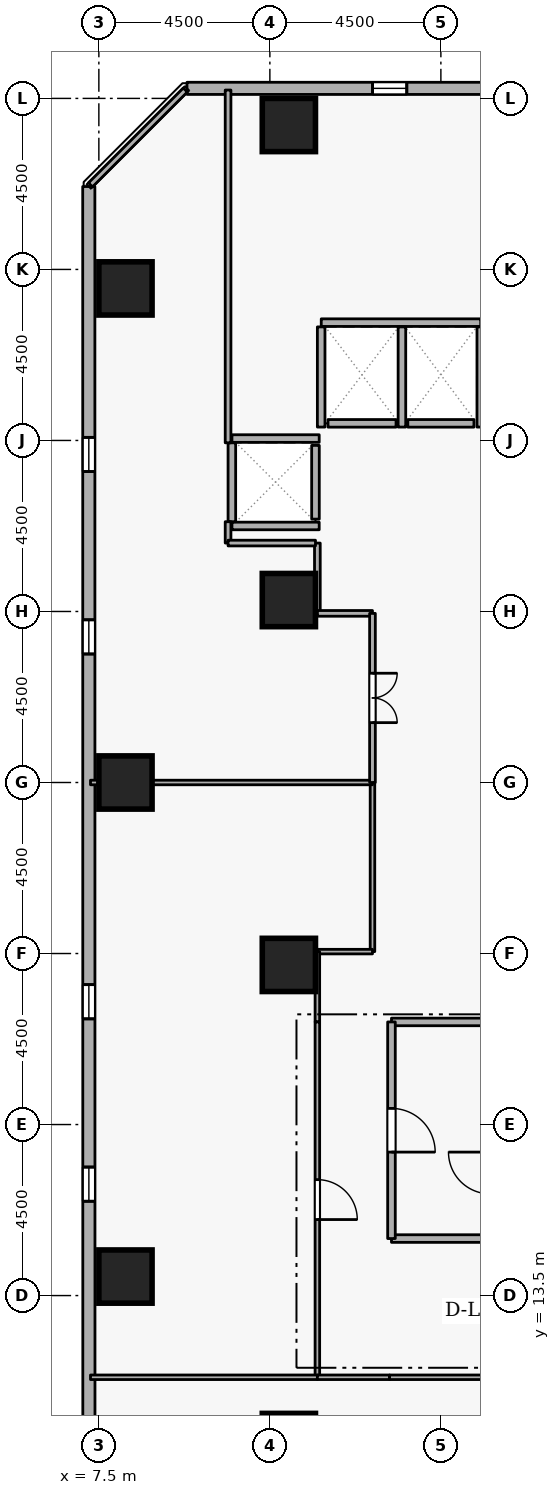
"""IFC4 building model, lengths in metres.
Left out: names, types, materials, properties, quantities, classifications, styles, units other than length and angle.
Written with IfcOpenShell. Run it as: python <this file> out.ifc"""

import sys

from ifc_helpers import new_model, si_unit, direction, frame, frame_2d, origin, origin_2d, place, context, subcontext, project, spatial, rectangle, extrude, element, fill, save


model = new_model("IFC4")
c1 = context("Model", 3, precision=1e-05, world=origin(), true_north=direction((0.0, 1.0)))
c2 = subcontext(c1, "Body", "Model", "MODEL_VIEW")
j1 = project(units=[si_unit("LENGTHUNIT", "METRE"), si_unit("PLANEANGLEUNIT", "RADIAN")], contexts=[c1])
p1 = place(None, origin())
s1 = spatial("IfcSite", under=j1, at=p1, CompositionType="ELEMENT")
p2 = place(p1, origin())
s2 = spatial("IfcBuilding", under=s1, at=p2, CompositionType="ELEMENT")
p3 = place(p2, frame((0.0, 0.0, 57.3)))
s3 = spatial("IfcBuildingStorey", under=s2, at=p3, CompositionType="ELEMENT", Elevation=57.3)
for number, where, z_axis, x_axis in (
    (1, (12.5, 9.7, 0.0), (0.0, 0.0, 1.0), (1.0, 0.0, 0.0)),
    (2, (12.5, 44.3, 0.0), (0.0, 0.0, 1.0), (1.0, 0.0, 0.0)),
    (3, (8.2, 14.0, 0.0), (0.0, 0.0, 1.0), (1.0, 0.0, 0.0)),
    (4, (8.2, 27.0, 0.0), (0.0, 0.0, 1.0), (1.0, 0.0, 0.0)),
    (5, (8.2, 40.0, 0.0), (0.0, 0.0, 1.0), (1.0, 0.0, 0.0)),
    (6, (12.5, 22.2, 0.0), (0.0, 0.0, 1.0), (1.0, 0.0, 0.0)),
    (7, (12.5, 31.8, 0.0), (0.0, 0.0, 1.0), (1.0, 0.0, 0.0)),
):
    element("IfcColumn", number, at=place(p3, frame(where, z_axis=z_axis, x_axis=x_axis)), inside=s3, PredefinedType="COLUMN", context=c2, shape_type="SweptSolid", body=[
        extrude(rectangle(XDim=1.4, YDim=1.4, at=origin_2d()), origin(), (0.0, 0.0, 1.0), 3.6),
    ])
p4 = place(p3, frame((46.203, 45.262, 0.0), z_axis=(0.0, 0.0, 1.0), x_axis=(-0.999999996195, 8.7231344e-05, 0.0)))
e8 = element("IfcWall", 8, at=p4, inside=s3, PredefinedType="STANDARD", context=c2, shape_type="SweptSolid", body=[
    extrude(rectangle(XDim=36.384, YDim=0.32, at=frame_2d((18.192, 0.0))), origin(), (0.0, 0.0, 1.0), 2.7),
])
p5 = place(p4, frame((1.8, 0.0, 0.72)))
e9 = element("IfcOpeningElement", 9, at=p5, cuts=e8, PredefinedType="OPENING", context=c2, shape_type="SweptSolid", body=[
    extrude(rectangle(XDim=0.9, YDim=1.75, at=frame_2d((0.45, 0.875))), frame((0.0, 0.17, 0.0), z_axis=(0.0, -1.0, 0.0), x_axis=(1.0, 0.0, 0.0)), (0.0, 0.0, 1.0), 0.34),
])
p6 = place(p4, frame((11.4, 0.0, 0.72)))
e10 = element("IfcOpeningElement", 10, at=p6, cuts=e8, PredefinedType="OPENING", context=c2, shape_type="SweptSolid", body=[
    extrude(rectangle(XDim=0.9, YDim=1.75, at=frame_2d((0.45, 0.875))), frame((0.0, 0.17, 0.0), z_axis=(0.0, -1.0, 0.0), x_axis=(1.0, 0.0, 0.0)), (0.0, 0.0, 1.0), 0.34),
])
p7 = place(p4, frame((16.2, 0.0, 0.72)))
e11 = element("IfcOpeningElement", 11, at=p7, cuts=e8, PredefinedType="OPENING", context=c2, shape_type="SweptSolid", body=[
    extrude(rectangle(XDim=0.9, YDim=1.75, at=frame_2d((0.45, 0.875))), frame((0.0, 0.17, 0.0), z_axis=(0.0, -1.0, 0.0), x_axis=(1.0, 0.0, 0.0)), (0.0, 0.0, 1.0), 0.34),
])
p8 = place(p4, frame((25.8, 0.0, 0.72)))
e12 = element("IfcOpeningElement", 12, at=p8, cuts=e8, PredefinedType="OPENING", context=c2, shape_type="SweptSolid", body=[
    extrude(rectangle(XDim=0.9, YDim=1.75, at=frame_2d((0.45, 0.875))), frame((0.0, 0.17, 0.0), z_axis=(0.0, -1.0, 0.0), x_axis=(1.0, 0.0, 0.0)), (0.0, 0.0, 1.0), 0.34),
])
p9 = place(p4, frame((30.6, 0.0, 0.72)))
e13 = element("IfcOpeningElement", 13, at=p9, cuts=e8, PredefinedType="OPENING", context=c2, shape_type="SweptSolid", body=[
    extrude(rectangle(XDim=0.9, YDim=1.75, at=frame_2d((0.45, 0.875))), frame((0.0, 0.17, 0.0), z_axis=(0.0, -1.0, 0.0), x_axis=(1.0, 0.0, 0.0)), (0.0, 0.0, 1.0), 0.34),
])
p10 = place(p3, frame((7.235, 42.681, 0.0), z_axis=(0.0, 0.0, 1.0), x_axis=(8.7231344e-05, -0.999999996195, 0.0)))
e14 = element("IfcWall", 14, at=p10, inside=s3, PredefinedType="STANDARD", context=c2, shape_type="SweptSolid", body=[
    extrude(rectangle(XDim=36.384, YDim=0.32, at=frame_2d((18.192, 0.0))), origin(), (0.0, 0.0, 1.0), 2.7),
])
p11 = place(p10, frame((6.6, 0.0, 0.72)))
e15 = element("IfcOpeningElement", 15, at=p11, cuts=e14, PredefinedType="OPENING", context=c2, shape_type="SweptSolid", body=[
    extrude(rectangle(XDim=0.9, YDim=1.75, at=frame_2d((0.45, 0.875))), frame((0.0, 0.17, 0.0), z_axis=(0.0, -1.0, 0.0), x_axis=(1.0, 0.0, 0.0)), (0.0, 0.0, 1.0), 0.34),
])
p12 = place(p10, frame((11.4, 0.0, 0.72)))
e16 = element("IfcOpeningElement", 16, at=p12, cuts=e14, PredefinedType="OPENING", context=c2, shape_type="SweptSolid", body=[
    extrude(rectangle(XDim=0.9, YDim=1.75, at=frame_2d((0.45, 0.875))), frame((0.0, 0.17, 0.0), z_axis=(0.0, -1.0, 0.0), x_axis=(1.0, 0.0, 0.0)), (0.0, 0.0, 1.0), 0.34),
])
p13 = place(p10, frame((21.0, 0.0, 0.72)))
e17 = element("IfcOpeningElement", 17, at=p13, cuts=e14, PredefinedType="OPENING", context=c2, shape_type="SweptSolid", body=[
    extrude(rectangle(XDim=0.9, YDim=1.75, at=frame_2d((0.45, 0.875))), frame((0.0, 0.17, 0.0), z_axis=(0.0, -1.0, 0.0), x_axis=(1.0, 0.0, 0.0)), (0.0, 0.0, 1.0), 0.34),
])
p14 = place(p10, frame((25.8, 0.0, 0.72)))
e18 = element("IfcOpeningElement", 18, at=p14, cuts=e14, PredefinedType="OPENING", context=c2, shape_type="SweptSolid", body=[
    extrude(rectangle(XDim=0.9, YDim=1.75, at=frame_2d((0.45, 0.875))), frame((0.0, 0.17, 0.0), z_axis=(0.0, -1.0, 0.0), x_axis=(1.0, 0.0, 0.0)), (0.0, 0.0, 1.0), 0.34),
])
p15 = place(p3, frame((17.37, 36.45, 0.0), z_axis=(0.0, 0.0, 1.0), x_axis=(-1.0, 0.0, 0.0)))
e19 = element("IfcWall", 19, at=p15, inside=s3, PredefinedType="STANDARD", context=c2, shape_type="SweptSolid", body=[
    extrude(rectangle(XDim=1.74, YDim=0.2, at=frame_2d((0.87, 0.0))), origin(), (0.0, 0.0, 1.0), 3.34),
])
p16 = place(p3, frame((15.32, 36.45, 0.0), z_axis=(0.0, 0.0, 1.0), x_axis=(-1.0, 0.0, 0.0)))
e20 = element("IfcWall", 20, at=p16, inside=s3, PredefinedType="STANDARD", context=c2, shape_type="SweptSolid", body=[
    extrude(rectangle(XDim=1.79, YDim=0.2, at=frame_2d((0.895, 0.0))), origin(), (0.0, 0.0, 1.0), 3.34),
])
p17 = place(p3, frame((13.2, 33.93, 0.0), z_axis=(0.0, 0.0, 1.0), x_axis=(0.0, 1.0, 0.0)))
e21 = element("IfcWall", 21, at=p17, inside=s3, PredefinedType="STANDARD", context=c2, shape_type="SweptSolid", body=[
    extrude(rectangle(XDim=1.94, YDim=0.2, at=frame_2d((0.97, 0.0))), origin(), (0.0, 0.0, 1.0), 3.34),
])
p18 = place(p3, frame((13.352, 39.1, 0.0), z_axis=(0.0, 0.0, 1.0), x_axis=(1.0, 0.0, 0.0)))
e22 = element("IfcWall", 22, at=p18, inside=s3, PredefinedType="STANDARD", context=c2, shape_type="SweptSolid", body=[
    extrude(rectangle(XDim=4.196, YDim=0.2, at=frame_2d((2.098, 0.0))), origin(), (0.0, 0.0, 1.0), 3.34),
])
p19 = place(p3, frame((17.55, 36.352, 0.0), z_axis=(0.0, 0.0, 1.0), x_axis=(0.0, 1.0, 0.0)))
e23 = element("IfcWall", 23, at=p19, inside=s3, PredefinedType="STANDARD", context=c2, shape_type="SweptSolid", body=[
    extrude(rectangle(XDim=2.636, YDim=0.2, at=frame_2d((1.318, 0.0))), origin(), (0.0, 0.0, 1.0), 2.545),
])
for number, where, z_axis, x_axis in (
    (24, (15.475, 36.352, 0.0), (0.0, 0.0, 1.0), (0.0, 1.0, 0.0)),
    (25, (13.35, 36.352, 0.0), (0.0, 0.0, 1.0), (0.0, 1.0, 0.0)),
):
    element("IfcWall", number, at=place(p3, frame(where, z_axis=z_axis, x_axis=x_axis)), inside=s3, PredefinedType="STANDARD", context=c2, shape_type="SweptSolid", body=[
        extrude(rectangle(XDim=2.636, YDim=0.2, at=frame_2d((1.318, 0.0))), origin(), (0.0, 0.0, 1.0), 3.34),
    ])
for number, where, z_axis, x_axis in (
    (26, (11.002, 36.05, 0.0), (0.0, 0.0, 1.0), (1.0, 0.0, 0.0)),
    (27, (11.002, 33.75, 0.0), (0.0, 0.0, 1.0), (1.0, 0.0, 0.0)),
):
    element("IfcWall", number, at=place(p3, frame(where, z_axis=z_axis, x_axis=x_axis)), inside=s3, PredefinedType="STANDARD", context=c2, shape_type="SweptSolid", body=[
        extrude(rectangle(XDim=2.296, YDim=0.2, at=frame_2d((1.148, 0.0))), origin(), (0.0, 0.0, 1.0), 3.34),
    ])
p20 = place(p3, frame((11.0, 33.862, 0.0), z_axis=(0.0, 0.0, 1.0), x_axis=(0.0, 1.0, 0.0)))
e28 = element("IfcWall", 28, at=p20, inside=s3, PredefinedType="STANDARD", context=c2, shape_type="SweptSolid", body=[
    extrude(rectangle(XDim=2.076, YDim=0.2, at=frame_2d((1.038, 0.0))), origin(), (0.0, 0.0, 1.0), 3.34),
])
for number, where, z_axis, x_axis in (
    (29, (15.2, 15.0, 0.0), (0.0, 0.0, 1.0), (1.0, 0.0, 0.0)),
    (30, (17.7, 20.7, 0.0), (0.0, 0.0, 1.0), (-1.0, 0.0, 0.0)),
):
    element("IfcWall", number, at=place(p3, frame(where, z_axis=z_axis, x_axis=x_axis)), inside=s3, PredefinedType="STANDARD", context=c2, shape_type="SweptSolid", body=[
        extrude(rectangle(XDim=2.5, YDim=0.2, at=frame_2d((1.25, 0.0))), origin(), (0.0, 0.0, 1.0), 3.34),
    ])
p21 = place(p3, frame((15.2, 20.7, 0.0), z_axis=(0.0, 0.0, 1.0), x_axis=(0.0, -1.0, 0.0)))
e31 = element("IfcWall", 31, at=p21, inside=s3, PredefinedType="STANDARD", context=c2, shape_type="SweptSolid", body=[
    extrude(rectangle(XDim=5.7, YDim=0.2, at=frame_2d((2.85, 0.0))), origin(), (0.0, 0.0, 1.0), 3.34),
])
p22 = place(p21, frame((2.275, 0.0, 0.0)))
e32 = element("IfcOpeningElement", 32, at=p22, cuts=e31, PredefinedType="OPENING", context=c2, shape_type="SweptSolid", body=[
    extrude(rectangle(XDim=1.15, YDim=2.1, at=frame_2d((0.575, 1.05))), frame((0.0, 0.11, 0.0), z_axis=(0.0, -1.0, 0.0), x_axis=(1.0, 0.0, 0.0)), (0.0, 0.0, 1.0), 0.22),
])
p23 = place(p3, frame((14.7, 27.0, 0.0), z_axis=(0.0, 0.0, 1.0), x_axis=(0.0, -1.0, 0.0)))
e33 = element("IfcWall", 33, at=p23, inside=s3, PredefinedType="PARTITIONING", context=c2, shape_type="SweptSolid", body=[
    extrude(rectangle(XDim=4.45, YDim=0.12, at=frame_2d((2.225, 0.0))), origin(), (0.0, 0.0, 1.0), 3.34),
])
p24 = place(p3, frame((14.7, 22.55, 0.0), z_axis=(0.0, 0.0, 1.0), x_axis=(-1.0, 0.0, 0.0)))
e34 = element("IfcWall", 34, at=p24, inside=s3, PredefinedType="PARTITIONING", context=c2, shape_type="SweptSolid", body=[
    extrude(rectangle(XDim=1.45, YDim=0.12, at=frame_2d((0.725, 0.0))), origin(), (0.0, 0.0, 1.0), 3.34),
])
p25 = place(p3, frame((13.25, 22.55, 0.0), z_axis=(0.0, 0.0, 1.0), x_axis=(0.0, -1.0, 0.0)))
e35 = element("IfcWall", 35, at=p25, inside=s3, PredefinedType="PARTITIONING", context=c2, shape_type="SweptSolid", body=[
    extrude(rectangle(XDim=1.85, YDim=0.12, at=frame_2d((0.925, 0.0))), origin(), (0.0, 0.0, 1.0), 3.34),
])
p26 = place(p3, frame((13.25, 20.7, 0.0), z_axis=(0.0, 0.0, 1.0), x_axis=(0.0, -1.0, 0.0)))
e36 = element("IfcWall", 36, at=p26, inside=s3, PredefinedType="PARTITIONING", context=c2, shape_type="SweptSolid", body=[
    extrude(rectangle(XDim=9.35, YDim=0.12, at=frame_2d((4.675, 0.0))), origin(), (0.0, 0.0, 1.0), 3.34),
])
p27 = place(p26, frame((4.15, 0.0, 0.0)))
e37 = element("IfcOpeningElement", 37, at=p27, cuts=e36, PredefinedType="OPENING", context=c2, shape_type="SweptSolid", body=[
    extrude(rectangle(XDim=1.05, YDim=2.1, at=frame_2d((0.525, 1.05))), frame((0.0, 0.07, 0.0), z_axis=(0.0, -1.0, 0.0), x_axis=(1.0, 0.0, 0.0)), (0.0, 0.0, 1.0), 0.14),
])
p28 = place(p3, frame((13.25, 11.35, 0.0), z_axis=(0.0, 0.0, 1.0), x_axis=(-1.0, 0.0, 0.0)))
e38 = element("IfcWall", 38, at=p28, inside=s3, PredefinedType="PARTITIONING", context=c2, shape_type="SweptSolid", body=[
    extrude(rectangle(XDim=5.97, YDim=0.12, at=frame_2d((2.985, 0.0))), origin(), (0.0, 0.0, 1.0), 3.34),
])
p29 = place(p3, frame((7.28, 27.0, 0.0), z_axis=(0.0, 0.0, 1.0), x_axis=(1.0, 0.0, 0.0)))
e39 = element("IfcWall", 39, at=p29, inside=s3, PredefinedType="PARTITIONING", context=c2, shape_type="SweptSolid", body=[
    extrude(rectangle(XDim=7.42, YDim=0.12, at=frame_2d((3.71, 0.0))), origin(), (0.0, 0.0, 1.0), 2.932),
])
p30 = place(p3, frame((13.25, 33.3, 0.0), z_axis=(0.0, 0.0, 1.0), x_axis=(0.0, -1.0, 0.0)))
e40 = element("IfcWall", 40, at=p30, inside=s3, PredefinedType="PARTITIONING", context=c2, shape_type="SweptSolid", body=[
    extrude(rectangle(XDim=1.85, YDim=0.15, at=frame_2d((0.925, 0.0))), origin(), (0.0, 0.0, 1.0), 3.34),
])
p31 = place(p3, frame((13.25, 31.45, 0.0), z_axis=(0.0, 0.0, 1.0), x_axis=(1.0, 0.0, 0.0)))
e41 = element("IfcWall", 41, at=p31, inside=s3, PredefinedType="PARTITIONING", context=c2, shape_type="SweptSolid", body=[
    extrude(rectangle(XDim=1.45, YDim=0.15, at=frame_2d((0.725, 0.0))), origin(), (0.0, 0.0, 1.0), 3.34),
])
p32 = place(p3, frame((14.7, 31.45, 0.0), z_axis=(0.0, 0.0, 1.0), x_axis=(0.0, -1.0, 0.0)))
e42 = element("IfcWall", 42, at=p32, inside=s3, PredefinedType="PARTITIONING", context=c2, shape_type="SweptSolid", body=[
    extrude(rectangle(XDim=4.45, YDim=0.15, at=frame_2d((2.225, 0.0))), origin(), (0.0, 0.0, 1.0), 3.34),
])
p33 = place(p32, frame((1.575, 0.0, 0.0)))
e43 = element("IfcOpeningElement", 43, at=p33, cuts=e42, PredefinedType="OPENING", context=c2, shape_type="SweptSolid", body=[
    extrude(rectangle(XDim=1.3, YDim=2.12, at=frame_2d((0.65, 1.06))), frame((0.0, 0.085, 0.0), z_axis=(0.0, -1.0, 0.0), x_axis=(1.0, 0.0, 0.0)), (0.0, 0.0, 1.0), 0.17),
])
p34 = place(p3, frame((7.28, 42.725, 0.0), z_axis=(0.0, 0.0, 1.0), x_axis=(0.707106781187, 0.707106781187, 0.0)))
e44 = element("IfcWall", 44, at=p34, inside=s3, PredefinedType="PARTITIONING", context=c2, shape_type="SweptSolid", body=[
    extrude(rectangle(XDim=3.528, YDim=0.15, at=frame_2d((1.764, 0.0))), origin(), (0.0, 0.0, 1.0), 3.34),
])
p35 = place(p3, frame((10.9, 45.22, 0.0), z_axis=(0.0, 0.0, 1.0), x_axis=(0.0, -1.0, 0.0)))
e45 = element("IfcWall", 45, at=p35, inside=s3, PredefinedType="PARTITIONING", context=c2, shape_type="SweptSolid", body=[
    extrude(rectangle(XDim=9.282, YDim=0.15, at=frame_2d((4.641, 0.0))), origin(), (0.0, 0.0, 1.0), 3.34),
])
p36 = place(p3, frame((10.9, 33.862, 0.0), z_axis=(0.0, 0.0, 1.0), x_axis=(0.0, -1.0, 0.0)))
e46 = element("IfcWall", 46, at=p36, inside=s3, PredefinedType="PARTITIONING", context=c2, shape_type="SweptSolid", body=[
    extrude(rectangle(XDim=0.562, YDim=0.15, at=frame_2d((0.281, 0.0))), origin(), (0.0, 0.0, 1.0), 3.34),
])
p37 = place(p3, frame((10.9, 33.3, 0.0), z_axis=(0.0, 0.0, 1.0), x_axis=(1.0, 0.0, 0.0)))
e47 = element("IfcWall", 47, at=p37, inside=s3, PredefinedType="PARTITIONING", context=c2, shape_type="SweptSolid", body=[
    extrude(rectangle(XDim=2.3, YDim=0.15, at=frame_2d((1.15, 0.0))), origin(), (0.0, 0.0, 1.0), 3.34),
])
p38 = place(p3, frame((13.25, 11.35, 0.0), z_axis=(0.0, 0.0, 1.0), x_axis=(1.0, 0.0, 0.0)))
e48 = element("IfcWall", 48, at=p38, inside=s3, PredefinedType="PARTITIONING", context=c2, shape_type="SweptSolid", body=[
    extrude(rectangle(XDim=1.9, YDim=0.12, at=frame_2d((0.95, 0.0))), origin(), (0.0, 0.0, 1.0), 3.34),
])
p39 = place(p3, frame((15.15, 11.35, 0.0), z_axis=(0.0, 0.0, 1.0), x_axis=(1.0, 0.0, 0.0)))
e49 = element("IfcWall", 49, at=p39, inside=s3, PredefinedType="PARTITIONING", context=c2, shape_type="SweptSolid", body=[
    extrude(rectangle(XDim=10.35, YDim=0.12, at=frame_2d((5.175, 0.0))), origin(), (0.0, 0.0, 1.0), 3.34),
])
p40 = place(p39, frame((4.65, 0.0, 0.0)))
e50 = element("IfcOpeningElement", 50, at=p40, cuts=e49, PredefinedType="OPENING", context=c2, shape_type="SweptSolid", body=[
    extrude(rectangle(XDim=1.05, YDim=2.1, at=frame_2d((0.525, 1.05))), frame((0.0, 0.07, 0.0), z_axis=(0.0, -1.0, 0.0), x_axis=(1.0, 0.0, 0.0)), (0.0, 0.0, 1.0), 0.14),
])
p41 = place(p9, origin())
e51 = element("IfcWindow", 51, at=p41, inside=s3, PartitioningType="SINGLE_PANEL", PredefinedType="WINDOW", context=c2, shape_type="SweptSolid", body=[
    extrude(rectangle(XDim=0.9, YDim=1.75, at=frame_2d((0.45, 0.875))), frame((0.0, 0.03, 0.0), z_axis=(0.0, -1.0, 0.0), x_axis=(1.0, 0.0, 0.0)), (0.0, 0.0, 1.0), 0.06),
])
fill(e13, e51)
p42 = place(p11, origin())
e52 = element("IfcWindow", 52, at=p42, inside=s3, PartitioningType="SINGLE_PANEL", PredefinedType="WINDOW", context=c2, shape_type="SweptSolid", body=[
    extrude(rectangle(XDim=0.9, YDim=1.75, at=frame_2d((0.45, 0.875))), frame((0.0, 0.03, 0.0), z_axis=(0.0, -1.0, 0.0), x_axis=(1.0, 0.0, 0.0)), (0.0, 0.0, 1.0), 0.06),
])
fill(e15, e52)
p43 = place(p12, origin())
e53 = element("IfcWindow", 53, at=p43, inside=s3, PartitioningType="SINGLE_PANEL", PredefinedType="WINDOW", context=c2, shape_type="SweptSolid", body=[
    extrude(rectangle(XDim=0.9, YDim=1.75, at=frame_2d((0.45, 0.875))), frame((0.0, 0.03, 0.0), z_axis=(0.0, -1.0, 0.0), x_axis=(1.0, 0.0, 0.0)), (0.0, 0.0, 1.0), 0.06),
])
fill(e16, e53)
p44 = place(p13, origin())
e54 = element("IfcWindow", 54, at=p44, inside=s3, PartitioningType="SINGLE_PANEL", PredefinedType="WINDOW", context=c2, shape_type="SweptSolid", body=[
    extrude(rectangle(XDim=0.9, YDim=1.75, at=frame_2d((0.45, 0.875))), frame((0.0, 0.03, 0.0), z_axis=(0.0, -1.0, 0.0), x_axis=(1.0, 0.0, 0.0)), (0.0, 0.0, 1.0), 0.06),
])
fill(e17, e54)
p45 = place(p14, origin())
e55 = element("IfcWindow", 55, at=p45, inside=s3, PartitioningType="SINGLE_PANEL", PredefinedType="WINDOW", context=c2, shape_type="SweptSolid", body=[
    extrude(rectangle(XDim=0.9, YDim=1.75, at=frame_2d((0.45, 0.875))), frame((0.0, 0.03, 0.0), z_axis=(0.0, -1.0, 0.0), x_axis=(1.0, 0.0, 0.0)), (0.0, 0.0, 1.0), 0.06),
])
fill(e18, e55)
p46 = place(p22, origin())
e56 = element("IfcDoor", 56, at=p46, inside=s3, OperationType="SINGLE_SWING_RIGHT", PredefinedType="DOOR", context=c2, shape_type="SweptSolid", body=[
    extrude(rectangle(XDim=1.15, YDim=2.1, at=frame_2d((0.575, 1.05))), frame((0.0, 0.025, 0.0), z_axis=(0.0, -1.0, 0.0), x_axis=(1.0, 0.0, 0.0)), (0.0, 0.0, 1.0), 0.05),
])
fill(e32, e56)
p47 = place(p27, origin())
e57 = element("IfcDoor", 57, at=p47, inside=s3, OperationType="SINGLE_SWING_RIGHT", PredefinedType="DOOR", context=c2, shape_type="SweptSolid", body=[
    extrude(rectangle(XDim=1.05, YDim=2.1, at=frame_2d((0.525, 1.05))), frame((0.0, 0.025, 0.0), z_axis=(0.0, -1.0, 0.0), x_axis=(1.0, 0.0, 0.0)), (0.0, 0.0, 1.0), 0.05),
])
fill(e37, e57)
p48 = place(p33, origin())
e58 = element("IfcDoor", 58, at=p48, inside=s3, OperationType="DOUBLE_DOOR_SINGLE_SWING", PredefinedType="DOOR", context=c2, shape_type="SweptSolid", body=[
    extrude(rectangle(XDim=1.3, YDim=2.12, at=frame_2d((0.65, 1.06))), frame((0.0, 0.025, 0.0), z_axis=(0.0, -1.0, 0.0), x_axis=(1.0, 0.0, 0.0)), (0.0, 0.0, 1.0), 0.05),
])
fill(e43, e58)
save(model, sys.argv[1])
